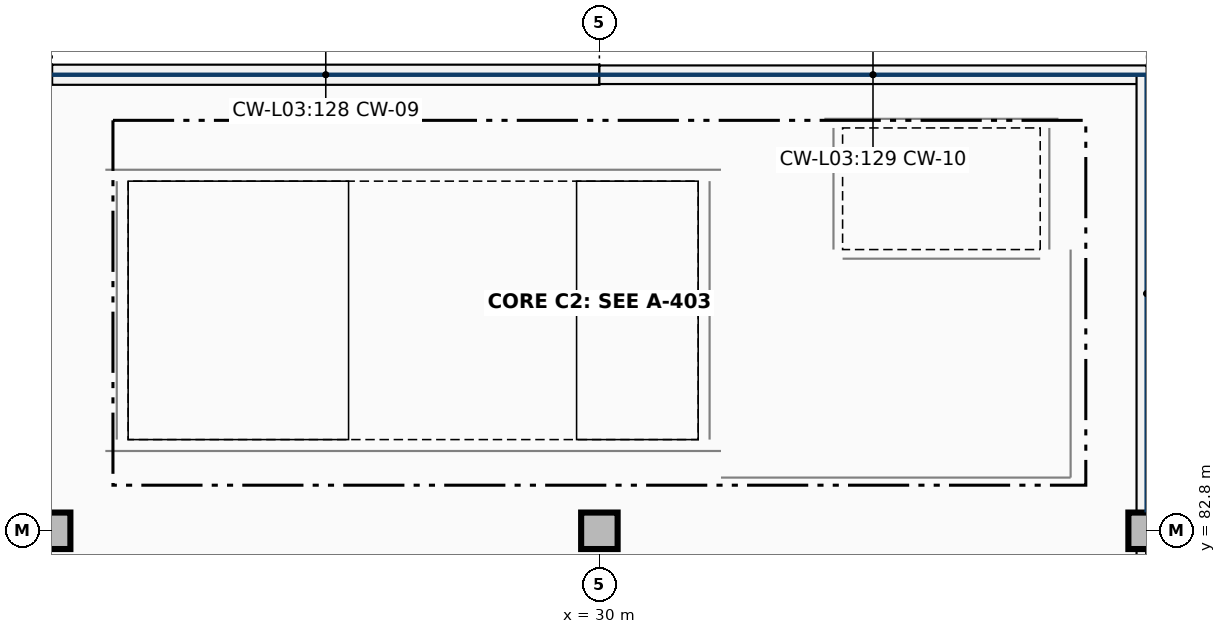
"""IFC4 building model, lengths in metres.
Left out: names, types, materials, properties, quantities, classifications, styles, units other than length and angle.
Written with IfcOpenShell. Run it as: python <this file> out.ifc"""

import sys

from ifc_helpers import new_model, si_unit, direction, frame, frame_2d, origin, origin_2d, place, context, subcontext, project, spatial, rectangle, extrude, element, fill, save


model = new_model("IFC4")
c1 = context("Model", 3, precision=1e-05, world=origin(), true_north=direction((0.0, 1.0)))
c2 = subcontext(c1, "Body", "Model", "MODEL_VIEW")
j1 = project(units=[si_unit("LENGTHUNIT", "METRE"), si_unit("PLANEANGLEUNIT", "RADIAN")], contexts=[c1])
p1 = place(None, origin())
s1 = spatial("IfcSite", under=j1, at=p1, CompositionType="ELEMENT")
p2 = place(p1, origin())
s2 = spatial("IfcBuilding", under=s1, at=p2, CompositionType="ELEMENT")
p3 = place(p2, frame((0.0, 0.0, 13.6)))
s3 = spatial("IfcBuildingStorey", under=s2, at=p3, CompositionType="ELEMENT", Elevation=13.6)
for number, where, z_axis, x_axis in (
    (1, (22.8, 82.8, 0.0), (0.0, 0.0, 1.0), (1.0, 0.0, 0.0)),
    (2, (30.0, 82.8, 0.0), (0.0, 0.0, 1.0), (1.0, 0.0, 0.0)),
    (3, (37.2, 82.8, 0.0), (0.0, 0.0, 1.0), (1.0, 0.0, 0.0)),
):
    element("IfcColumn", number, at=place(p3, frame(where, z_axis=z_axis, x_axis=x_axis)), inside=s3, PredefinedType="COLUMN", context=c2, shape_type="SweptSolid", body=[
        extrude(rectangle(XDim=0.48, YDim=0.48, at=origin_2d()), origin(), (0.0, 0.0, 1.0), 3.74),
    ])
p4 = place(p3, frame((15.6, 88.8, 0.0), z_axis=(0.0, 0.0, 1.0), x_axis=(1.0, 0.0, 0.0)))
e4 = element("IfcWall", 4, at=p4, inside=s3, PredefinedType="SOLIDWALL", context=c2, shape_type="SweptSolid", body=[
    extrude(rectangle(XDim=7.2, YDim=0.245, at=frame_2d((3.6, 0.0))), origin(), (0.0, 0.0, 1.0), 0.85),
])
p5 = place(p3, frame((22.8, 88.8, 0.0), z_axis=(0.0, 0.0, 1.0), x_axis=(1.0, 0.0, 0.0)))
e5 = element("IfcWall", 5, at=p5, inside=s3, PredefinedType="SOLIDWALL", context=c2, shape_type="SweptSolid", body=[
    extrude(rectangle(XDim=7.2, YDim=0.265, at=frame_2d((3.6, 0.0))), origin(), (0.0, 0.0, 1.0), 0.85),
])
p6 = place(p3, frame((30.0, 88.8, 0.0), z_axis=(0.0, 0.0, 1.0), x_axis=(1.0, 0.0, 0.0)))
e6 = element("IfcWall", 6, at=p6, inside=s3, PredefinedType="SOLIDWALL", context=c2, shape_type="SweptSolid", body=[
    extrude(rectangle(XDim=7.2, YDim=0.245, at=frame_2d((3.6, 0.0))), origin(), (0.0, 0.0, 1.0), 0.85),
])
p7 = place(p3, frame((37.2, 79.442, 0.0), z_axis=(0.0, 0.0, 1.0), x_axis=(0.0, 1.0, 0.0)))
e7 = element("IfcWall", 7, at=p7, inside=s3, PredefinedType="SOLIDWALL", context=c2, shape_type="SweptSolid", body=[
    extrude(rectangle(XDim=3.116, YDim=0.265, at=frame_2d((1.558, 0.0))), origin(), (0.0, 0.0, 1.0), 2.969),
])
p8 = place(p3, frame((37.2, 83.042, 0.0), z_axis=(0.0, 0.0, 1.0), x_axis=(0.0, 1.0, 0.0)))
e8 = element("IfcWall", 8, at=p8, inside=s3, PredefinedType="SOLIDWALL", context=c2, shape_type="SweptSolid", body=[
    extrude(rectangle(XDim=5.758, YDim=0.265, at=frame_2d((2.879, 0.0))), origin(), (0.0, 0.0, 1.0), 0.85),
])
p9 = place(p3, frame((23.65, 84.0, 0.0), z_axis=(0.0, 0.0, 1.0), x_axis=(0.0, 1.0, 0.0)))
e9 = element("IfcWall", 9, at=p9, inside=s3, PredefinedType="SHEAR", context=c2, shape_type="SweptSolid", body=[
    extrude(rectangle(XDim=3.4, YDim=0.3, at=frame_2d((1.7, 0.0))), origin(), (0.0, 0.0, 1.0), 3.74),
])
for number, where, z_axis, x_axis in (
    (10, (23.5, 83.85, 0.0), (0.0, 0.0, 1.0), (1.0, 0.0, 0.0)),
    (11, (23.5, 87.55, 0.0), (0.0, 0.0, 1.0), (1.0, 0.0, 0.0)),
):
    element("IfcWall", number, at=place(p3, frame(where, z_axis=z_axis, x_axis=x_axis)), inside=s3, PredefinedType="SHEAR", context=c2, shape_type="SweptSolid", body=[
        extrude(rectangle(XDim=8.1, YDim=0.3, at=frame_2d((4.05, 0.0))), origin(), (0.0, 0.0, 1.0), 3.74),
    ])
p10 = place(p3, frame((31.45, 84.0, 0.0), z_axis=(0.0, 0.0, 1.0), x_axis=(0.0, 1.0, 0.0)))
e12 = element("IfcWall", 12, at=p10, inside=s3, PredefinedType="SHEAR", context=c2, shape_type="SweptSolid", body=[
    extrude(rectangle(XDim=3.4, YDim=0.3, at=frame_2d((1.7, 0.0))), origin(), (0.0, 0.0, 1.0), 3.74),
])
p11 = place(p10, frame((0.65, 0.0, 0.0)))
e13 = element("IfcOpeningElement", 13, at=p11, cuts=e12, PredefinedType="OPENING", context=c2, shape_type="SweptSolid", body=[
    extrude(rectangle(XDim=1.2, YDim=2.2, at=frame_2d((0.6, 1.1))), frame((0.0, 0.16, 0.0), z_axis=(0.0, -1.0, 0.0), x_axis=(1.0, 0.0, 0.0)), (0.0, 0.0, 1.0), 0.32),
])
for number, where, z_axis, x_axis in (
    (14, (33.08, 86.5, 0.0), (0.0, 0.0, 1.0), (0.0, 1.0, 0.0)),
    (15, (35.92, 86.5, 0.0), (0.0, 0.0, 1.0), (0.0, 1.0, 0.0)),
):
    element("IfcWall", number, at=place(p3, frame(where, z_axis=z_axis, x_axis=x_axis)), inside=s3, PredefinedType="SHEAR", context=c2, shape_type="SweptSolid", body=[
        extrude(rectangle(XDim=1.6, YDim=0.24, at=frame_2d((0.8, 0.0))), origin(), (0.0, 0.0, 1.0), 3.74),
    ])
p12 = place(p3, frame((32.96, 88.22, 0.0), z_axis=(0.0, 0.0, 1.0), x_axis=(1.0, 0.0, 0.0)))
e16 = element("IfcWall", 16, at=p12, inside=s3, PredefinedType="SHEAR", context=c2, shape_type="SweptSolid", body=[
    extrude(rectangle(XDim=3.08, YDim=0.24, at=frame_2d((1.54, 0.0))), origin(), (0.0, 0.0, 1.0), 3.74),
])
p13 = place(p3, frame((33.2, 86.38, 0.0), z_axis=(0.0, 0.0, 1.0), x_axis=(1.0, 0.0, 0.0)))
e17 = element("IfcWall", 17, at=p13, inside=s3, PredefinedType="SHEAR", context=c2, shape_type="SweptSolid", body=[
    extrude(rectangle(XDim=2.6, YDim=0.24, at=frame_2d((1.3, 0.0))), origin(), (0.0, 0.0, 1.0), 3.74),
])
p14 = place(p13, frame((0.8, 0.0, 0.0)))
e18 = element("IfcOpeningElement", 18, at=p14, cuts=e17, PredefinedType="OPENING", context=c2, shape_type="SweptSolid", body=[
    extrude(rectangle(XDim=1.0, YDim=2.15, at=frame_2d((0.5, 1.075))), frame((0.0, 0.13, 0.0), z_axis=(0.0, -1.0, 0.0), x_axis=(1.0, 0.0, 0.0)), (0.0, 0.0, 1.0), 0.26),
])
p15 = place(p3, frame((36.2, 83.5, 0.0), z_axis=(0.0, 0.0, 1.0), x_axis=(0.0, 1.0, 0.0)))
e19 = element("IfcWall", 19, at=p15, inside=s3, PredefinedType="PARTITIONING", context=c2, shape_type="SweptSolid", body=[
    extrude(rectangle(XDim=3.0, YDim=0.2, at=frame_2d((1.5, 0.0))), origin(), (0.0, 0.0, 1.0), 3.414),
])
p16 = place(p3, frame((31.6, 83.5, 0.0), z_axis=(0.0, 0.0, 1.0), x_axis=(1.0, 0.0, 0.0)))
e20 = element("IfcWall", 20, at=p16, inside=s3, PredefinedType="PARTITIONING", context=c2, shape_type="SweptSolid", body=[
    extrude(rectangle(XDim=4.6, YDim=0.2, at=frame_2d((2.3, 0.0))), origin(), (0.0, 0.0, 1.0), 3.414),
])
p17 = place(p16, frame((1.575, 0.0, 0.0)))
e21 = element("IfcOpeningElement", 21, at=p17, cuts=e20, PredefinedType="OPENING", context=c2, shape_type="SweptSolid", body=[
    extrude(rectangle(XDim=1.45, YDim=2.2, at=frame_2d((0.725, 1.1))), frame((0.0, 0.11, 0.0), z_axis=(0.0, -1.0, 0.0), x_axis=(1.0, 0.0, 0.0)), (0.0, 0.0, 1.0), 0.22),
])
p18 = place(p11, origin())
e22 = element("IfcDoor", 22, at=p18, inside=s3, OperationType="SINGLE_SWING_LEFT", PredefinedType="DOOR", context=c2, shape_type="SweptSolid", body=[
    extrude(rectangle(XDim=1.2, YDim=2.2, at=frame_2d((0.6, 1.1))), frame((0.0, 0.025, 0.0), z_axis=(0.0, -1.0, 0.0), x_axis=(1.0, 0.0, 0.0)), (0.0, 0.0, 1.0), 0.05),
])
fill(e13, e22)
p19 = place(p14, origin())
e23 = element("IfcDoor", 23, at=p19, inside=s3, OperationType="DOUBLE_DOOR_SLIDING", PredefinedType="DOOR", context=c2, shape_type="SweptSolid", body=[
    extrude(rectangle(XDim=1.0, YDim=2.15, at=frame_2d((0.5, 1.075))), frame((0.0, 0.025, 0.0), z_axis=(0.0, -1.0, 0.0), x_axis=(1.0, 0.0, 0.0)), (0.0, 0.0, 1.0), 0.05),
])
fill(e18, e23)
p20 = place(p17, frame((1.45, 0.0, 0.0), z_axis=(0.0, 0.0, 1.0), x_axis=(-1.0, 0.0, 0.0)))
e24 = element("IfcDoor", 24, at=p20, inside=s3, OperationType="DOUBLE_DOOR_SINGLE_SWING", PredefinedType="DOOR", context=c2, shape_type="SweptSolid", body=[
    extrude(rectangle(XDim=1.45, YDim=2.2, at=frame_2d((0.725, 1.1))), frame((0.0, 0.025, 0.0), z_axis=(0.0, -1.0, 0.0), x_axis=(1.0, 0.0, 0.0)), (0.0, 0.0, 1.0), 0.05),
])
fill(e21, e24)
save(model, sys.argv[1])
